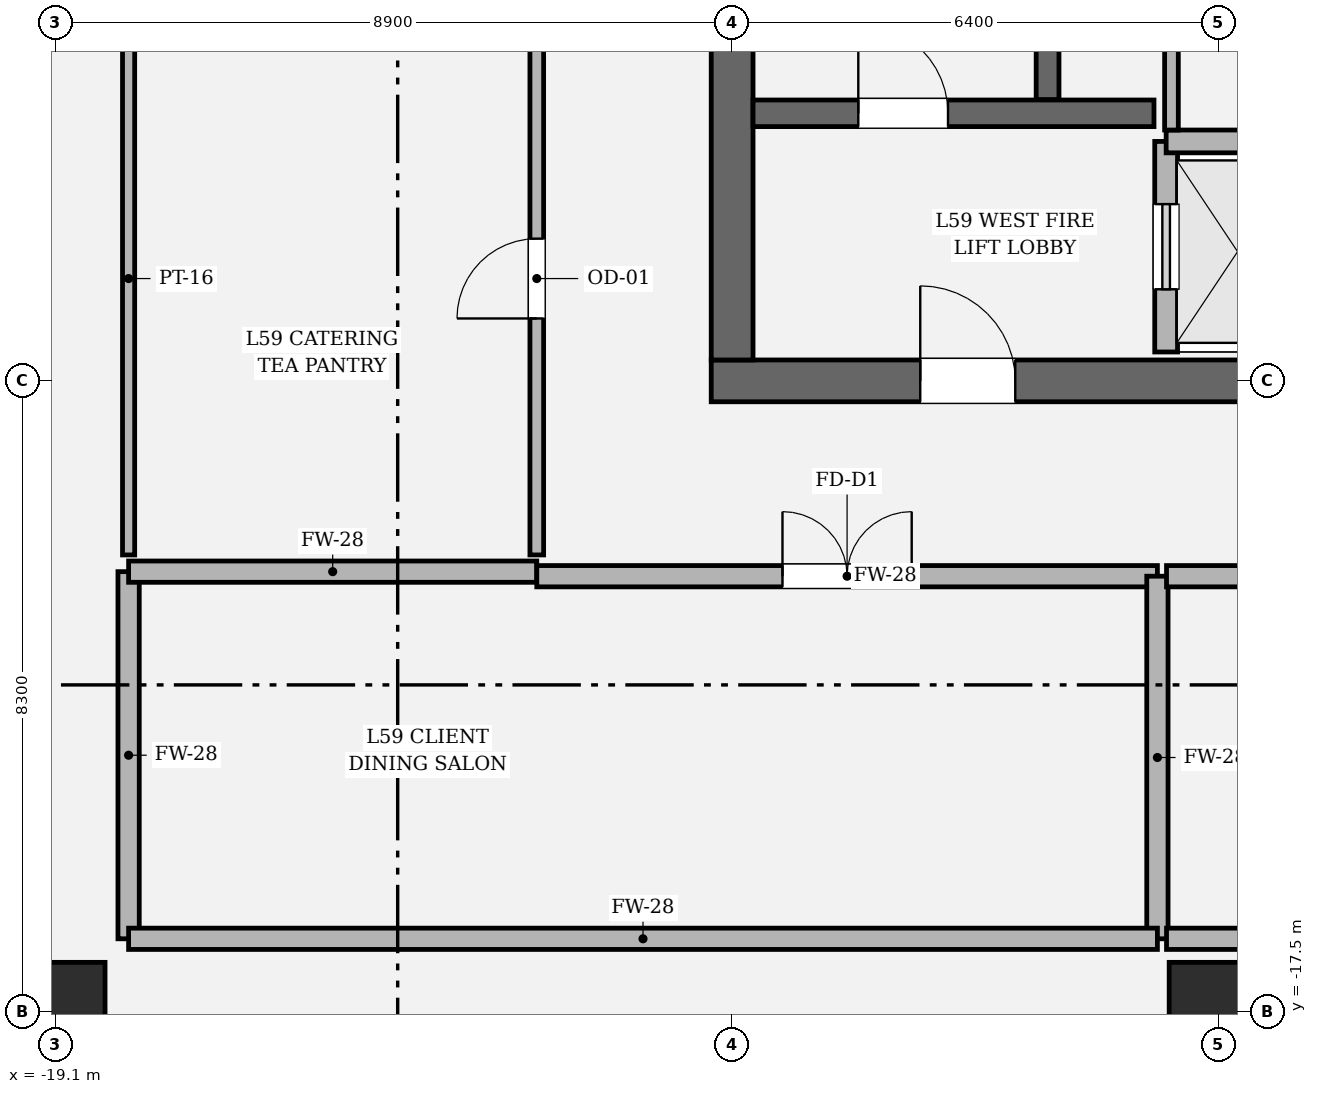
"""IFC4 building model, lengths in metres.
Left out: names, types, materials, properties, quantities, classifications, styles, units other than length and angle.
Written with IfcOpenShell. Run it as: python <this file> out.ifc"""

import sys

from ifc_helpers import new_model, si_unit, direction, frame, frame_2d, origin, origin_2d, place, context, subcontext, project, spatial, rectangle, hollow_rectangle, extrude, element, fill, save


model = new_model("IFC4")
c1 = context("Model", 3, precision=1e-05, world=origin(), true_north=direction((0.0, 1.0)))
c2 = subcontext(c1, "Body", "Model", "MODEL_VIEW")
j1 = project(units=[si_unit("LENGTHUNIT", "METRE"), si_unit("PLANEANGLEUNIT", "RADIAN")], contexts=[c1])
p1 = place(None, origin())
s1 = spatial("IfcSite", under=j1, at=p1, CompositionType="ELEMENT")
p2 = place(p1, origin())
s2 = spatial("IfcBuilding", under=s1, at=p2, CompositionType="ELEMENT")
p3 = place(p2, frame((0.0, 0.0, 251.4)))
s3 = spatial("IfcBuildingStorey", under=s2, at=p3, CompositionType="ELEMENT", Elevation=251.4)
p4 = place(p3, frame((10.475, -9.2, 0.0), z_axis=(0.0, 0.0, 1.0), x_axis=(-1.0, 0.0, 0.0)))
e1 = element("IfcWall", 1, at=p4, inside=s3, PredefinedType="SHEAR", context=c2, shape_type="SweptSolid", body=[
    extrude(rectangle(XDim=20.95, YDim=0.55, at=frame_2d((10.475, 0.0))), origin(), (0.0, 0.0, 1.0), 4.05),
])
p5 = place(p4, frame((2.75, 0.0, 0.0)))
e2 = element("IfcOpeningElement", 2, at=p5, cuts=e1, PredefinedType="OPENING", context=c2, shape_type="SweptSolid", body=[
    extrude(rectangle(XDim=1.25, YDim=2.25, at=frame_2d((0.625, 1.125))), frame((0.0, 0.285, 0.0), z_axis=(0.0, -1.0, 0.0), x_axis=(1.0, 0.0, 0.0)), (0.0, 0.0, 1.0), 0.57),
])
p6 = place(p4, frame((16.95, 0.0, 0.0)))
e3 = element("IfcOpeningElement", 3, at=p6, cuts=e1, PredefinedType="OPENING", context=c2, shape_type="SweptSolid", body=[
    extrude(rectangle(XDim=1.25, YDim=2.25, at=frame_2d((0.625, 1.125))), frame((0.0, 0.285, 0.0), z_axis=(0.0, -1.0, 0.0), x_axis=(1.0, 0.0, 0.0)), (0.0, 0.0, 1.0), 0.57),
])
p7 = place(p3, frame((-10.2, -8.925, 0.0), z_axis=(0.0, 0.0, 1.0), x_axis=(0.0, 1.0, 0.0)))
e4 = element("IfcWall", 4, at=p7, inside=s3, PredefinedType="SHEAR", context=c2, shape_type="SweptSolid", body=[
    extrude(rectangle(XDim=17.85, YDim=0.55, at=frame_2d((8.925, 0.0))), origin(), (0.0, 0.0, 1.0), 4.05),
])
p8 = place(p7, frame((12.715, 0.0, 0.0)))
e5 = element("IfcOpeningElement", 5, at=p8, cuts=e4, PredefinedType="OPENING", context=c2, shape_type="SweptSolid", body=[
    extrude(rectangle(XDim=1.18, YDim=2.2, at=frame_2d((0.59, 1.1))), frame((0.0, 0.285, 0.0), z_axis=(0.0, -1.0, 0.0), x_axis=(1.0, 0.0, 0.0)), (0.0, 0.0, 1.0), 0.57),
])
p9 = place(p3, frame((-6.05, -5.5, 0.0), z_axis=(0.0, 0.0, 1.0), x_axis=(0.0, 1.0, 0.0)))
e6 = element("IfcWall", 6, at=p9, inside=s3, PredefinedType="SOLIDWALL", context=c2, shape_type="SweptSolid", body=[
    extrude(rectangle(XDim=8.95, YDim=0.3, at=frame_2d((4.475, 0.0))), origin(), (0.0, 0.0, 1.0), 4.05),
])
p10 = place(p3, frame((-9.925, -5.68, 0.0), z_axis=(0.0, 0.0, 1.0), x_axis=(1.0, 0.0, 0.0)))
e7 = element("IfcWall", 7, at=p10, inside=s3, PredefinedType="SOLIDWALL", context=c2, shape_type="SweptSolid", body=[
    extrude(rectangle(XDim=5.275, YDim=0.35, at=frame_2d((2.638, 0.0))), origin(), (0.0, 0.0, 1.0), 4.05),
])
p11 = place(p10, frame((1.385, 0.0, 0.0)))
e8 = element("IfcOpeningElement", 8, at=p11, cuts=e7, PredefinedType="OPENING", context=c2, shape_type="SweptSolid", body=[
    extrude(rectangle(XDim=1.18, YDim=2.2, at=frame_2d((0.59, 1.1))), frame((0.0, 0.185, 0.0), z_axis=(0.0, -1.0, 0.0), x_axis=(1.0, 0.0, 0.0)), (0.0, 0.0, 1.0), 0.37),
])
for number, where, z_axis, x_axis in (
    (9, (-19.1, -17.5, 0.0), (0.0, 0.0, 1.0), (1.0, 0.0, 0.0)),
    (10, (-3.8, -17.5, 0.0), (0.0, 0.0, 1.0), (1.0, 0.0, 0.0)),
):
    element("IfcColumn", number, at=place(p3, frame(where, z_axis=z_axis, x_axis=x_axis)), inside=s3, PredefinedType="COLUMN", context=c2, shape_type="SweptSolid", body=[
        extrude(hollow_rectangle(XDim=1.3, YDim=1.3, WallThickness=0.038, at=origin_2d()), origin(), (0.0, 0.0, 1.0), 4.05),
    ])
p12 = place(p3, frame((-19.646, -16.949, 0.0), z_axis=(0.0, 0.0, 1.0), x_axis=(0.707106781187, -0.707106781187, 0.0)))
e11 = element("IfcWall", 11, at=p12, inside=s3, PredefinedType="SOLIDWALL", context=c2, shape_type="SweptSolid", body=[
    extrude(rectangle(XDim=1.552, YDim=0.32, at=frame_2d((0.776, 0.0))), origin(), (0.0, 0.0, 1.0), 3.244),
])
p13 = place(p3, frame((-4.49, -8.82, 0.0), z_axis=(0.0, 0.0, 1.0), x_axis=(0.0, 1.0, 0.0)))
e12 = element("IfcWall", 12, at=p13, inside=s3, PredefinedType="SOLIDWALL", context=c2, shape_type="SweptSolid", body=[
    extrude(rectangle(XDim=2.77, YDim=0.3, at=frame_2d((1.385, 0.0))), origin(), (0.0, 0.0, 1.0), 3.85),
])
p14 = place(p13, frame((0.825, 0.0, 0.0)))
e13 = element("IfcOpeningElement", 13, at=p14, cuts=e12, PredefinedType="OPENING", context=c2, shape_type="SweptSolid", body=[
    extrude(rectangle(XDim=1.12, YDim=2.25, at=frame_2d((0.56, 1.125))), frame((0.0, 0.16, 0.0), z_axis=(0.0, -1.0, 0.0), x_axis=(1.0, 0.0, 0.0)), (0.0, 0.0, 1.0), 0.32),
])
p15 = place(p3, frame((-4.49, -6.05, 0.0), z_axis=(0.0, 0.0, 1.0), x_axis=(1.0, 0.0, 0.0)))
e14 = element("IfcWall", 14, at=p15, inside=s3, PredefinedType="SOLIDWALL", context=c2, shape_type="SweptSolid", body=[
    extrude(rectangle(XDim=1.88, YDim=0.3, at=frame_2d((0.94, 0.0))), origin(), (0.0, 0.0, 1.0), 3.85),
])
p16 = place(p3, frame((-4.42, -4.16, 0.0), z_axis=(0.0, 0.0, 1.0), x_axis=(0.0, -1.0, 0.0)))
e15 = element("IfcWall", 15, at=p16, inside=s3, PredefinedType="PARTITIONING", context=c2, shape_type="SweptSolid", body=[
    extrude(rectangle(XDim=1.74, YDim=0.18, at=frame_2d((0.87, 0.0))), origin(), (0.0, 0.0, 1.0), 3.85),
])
p17 = place(p3, frame((-18.14, -16.54, 0.0), z_axis=(0.0, 0.0, 1.0), x_axis=(0.0, 1.0, 0.0)))
e16 = element("IfcWall", 16, at=p17, inside=s3, PredefinedType="SOLIDWALL", context=c2, shape_type="SweptSolid", body=[
    extrude(rectangle(XDim=4.83, YDim=0.28, at=frame_2d((2.415, 0.0))), origin(), (0.0, 0.0, 1.0), 3.484),
])
p18 = place(p3, frame((-18.14, -11.71, 0.0), z_axis=(0.0, 0.0, 1.0), x_axis=(1.0, 0.0, 0.0)))
e17 = element("IfcWall", 17, at=p18, inside=s3, PredefinedType="SOLIDWALL", context=c2, shape_type="SweptSolid", body=[
    extrude(rectangle(XDim=5.37, YDim=0.28, at=frame_2d((2.685, 0.0))), origin(), (0.0, 0.0, 1.0), 3.484),
])
p19 = place(p3, frame((-12.77, -11.77, 0.0), z_axis=(0.0, 0.0, 1.0), x_axis=(1.0, 0.0, 0.0)))
e18 = element("IfcWall", 18, at=p19, inside=s3, PredefinedType="SOLIDWALL", context=c2, shape_type="SweptSolid", body=[
    extrude(rectangle(XDim=8.165, YDim=0.28, at=frame_2d((4.083, 0.0))), origin(), (0.0, 0.0, 1.0), 3.244),
])
p20 = place(p19, frame((3.232, 0.0, 0.0)))
e19 = element("IfcOpeningElement", 19, at=p20, cuts=e18, PredefinedType="OPENING", context=c2, shape_type="SweptSolid", body=[
    extrude(rectangle(XDim=1.7, YDim=2.3, at=frame_2d((0.85, 1.15))), frame((0.0, 0.15, 0.0), z_axis=(0.0, -1.0, 0.0), x_axis=(1.0, 0.0, 0.0)), (0.0, 0.0, 1.0), 0.3),
])
p21 = place(p3, frame((-4.605, -11.77, 0.0), z_axis=(0.0, 0.0, 1.0), x_axis=(0.0, -1.0, 0.0)))
e20 = element("IfcWall", 20, at=p21, inside=s3, PredefinedType="SOLIDWALL", context=c2, shape_type="SweptSolid", body=[
    extrude(rectangle(XDim=4.77, YDim=0.28, at=frame_2d((2.385, 0.0))), origin(), (0.0, 0.0, 1.0), 3.85),
])
p22 = place(p3, frame((-4.605, -16.54, 0.0), z_axis=(0.0, 0.0, 1.0), x_axis=(-1.0, 0.0, 0.0)))
e21 = element("IfcWall", 21, at=p22, inside=s3, PredefinedType="SOLIDWALL", context=c2, shape_type="SweptSolid", body=[
    extrude(rectangle(XDim=13.535, YDim=0.28, at=frame_2d((6.768, 0.0))), origin(), (0.0, 0.0, 1.0), 3.244),
])
p23 = place(p3, frame((-4.485, -11.77, 0.0), z_axis=(0.0, 0.0, 1.0), x_axis=(1.0, 0.0, 0.0)))
e22 = element("IfcWall", 22, at=p23, inside=s3, PredefinedType="SOLIDWALL", context=c2, shape_type="SweptSolid", body=[
    extrude(rectangle(XDim=17.255, YDim=0.28, at=frame_2d((8.627, 0.0))), origin(), (0.0, 0.0, 1.0), 3.244),
])
p24 = place(p23, frame((7.778, 0.0, 0.0)))
e23 = element("IfcOpeningElement", 23, at=p24, cuts=e22, PredefinedType="OPENING", context=c2, shape_type="SweptSolid", body=[
    extrude(rectangle(XDim=1.7, YDim=2.3, at=frame_2d((0.85, 1.15))), frame((0.0, 0.15, 0.0), z_axis=(0.0, -1.0, 0.0), x_axis=(1.0, 0.0, 0.0)), (0.0, 0.0, 1.0), 0.3),
])
p25 = place(p3, frame((24.04, -16.54, 0.0), z_axis=(0.0, 0.0, 1.0), x_axis=(-1.0, 0.0, 0.0)))
e24 = element("IfcWall", 24, at=p25, inside=s3, PredefinedType="SOLIDWALL", context=c2, shape_type="SweptSolid", body=[
    extrude(rectangle(XDim=28.525, YDim=0.28, at=frame_2d((14.263, 0.0))), origin(), (0.0, 0.0, 1.0), 3.244),
])
p26 = place(p3, frame((-12.77, -4.218, 0.0), z_axis=(0.0, 0.0, 1.0), x_axis=(0.0, -1.0, 0.0)))
e25 = element("IfcWall", 25, at=p26, inside=s3, PredefinedType="PARTITIONING", context=c2, shape_type="SweptSolid", body=[
    extrude(rectangle(XDim=7.272, YDim=0.18, at=frame_2d((3.636, 0.0))), origin(), (0.0, 0.0, 1.0), 3.244),
])
p27 = place(p26, frame((3.111, 0.0, 0.0)))
e26 = element("IfcOpeningElement", 26, at=p27, cuts=e25, PredefinedType="OPENING", context=c2, shape_type="SweptSolid", body=[
    extrude(rectangle(XDim=1.05, YDim=2.2, at=frame_2d((0.525, 1.1))), frame((0.0, 0.1, 0.0), z_axis=(0.0, -1.0, 0.0), x_axis=(1.0, 0.0, 0.0)), (0.0, 0.0, 1.0), 0.2),
])
p28 = place(p3, frame((-18.14, -11.49, 0.0), z_axis=(0.0, 0.0, 1.0), x_axis=(0.0, 1.0, 0.0)))
e27 = element("IfcWall", 27, at=p28, inside=s3, PredefinedType="PARTITIONING", context=c2, shape_type="SweptSolid", body=[
    extrude(rectangle(XDim=7.272, YDim=0.16, at=frame_2d((3.636, 0.0))), origin(), (0.0, 0.0, 1.0), 3.244),
])
p29 = place(p11, origin())
e28 = element("IfcDoor", 28, at=p29, inside=s3, OperationType="SINGLE_SWING_LEFT", PredefinedType="DOOR", context=c2, shape_type="SweptSolid", body=[
    extrude(rectangle(XDim=1.18, YDim=2.2, at=frame_2d((0.59, 1.1))), frame((0.0, 0.025, 0.0), z_axis=(0.0, -1.0, 0.0), x_axis=(1.0, 0.0, 0.0)), (0.0, 0.0, 1.0), 0.05),
])
fill(e8, e28)
p30 = place(p6, origin())
e29 = element("IfcDoor", 29, at=p30, inside=s3, OperationType="SINGLE_SWING_RIGHT", PredefinedType="DOOR", context=c2, shape_type="SweptSolid", body=[
    extrude(rectangle(XDim=1.25, YDim=2.25, at=frame_2d((0.625, 1.125))), frame((0.0, 0.025, 0.0), z_axis=(0.0, -1.0, 0.0), x_axis=(1.0, 0.0, 0.0)), (0.0, 0.0, 1.0), 0.05),
])
fill(e3, e29)
p31 = place(p14, origin())
e30 = element("IfcDoor", 30, at=p31, inside=s3, OperationType="SLIDING_TO_LEFT", PredefinedType="DOOR", context=c2, shape_type="SweptSolid", body=[
    extrude(rectangle(XDim=1.12, YDim=2.25, at=frame_2d((0.56, 1.125))), frame((0.0, 0.025, 0.0), z_axis=(0.0, -1.0, 0.0), x_axis=(1.0, 0.0, 0.0)), (0.0, 0.0, 1.0), 0.05),
])
fill(e13, e30)
p32 = place(p20, origin())
e31 = element("IfcDoor", 31, at=p32, inside=s3, OperationType="DOUBLE_DOOR_SINGLE_SWING", PredefinedType="DOOR", context=c2, shape_type="SweptSolid", body=[
    extrude(rectangle(XDim=1.7, YDim=2.3, at=frame_2d((0.85, 1.15))), frame((0.0, 0.025, 0.0), z_axis=(0.0, -1.0, 0.0), x_axis=(1.0, 0.0, 0.0)), (0.0, 0.0, 1.0), 0.05),
])
fill(e19, e31)
p33 = place(p27, origin())
e32 = element("IfcDoor", 32, at=p33, inside=s3, OperationType="SINGLE_SWING_RIGHT", PredefinedType="DOOR", context=c2, shape_type="SweptSolid", body=[
    extrude(rectangle(XDim=1.05, YDim=2.2, at=frame_2d((0.525, 1.1))), frame((0.0, 0.025, 0.0), z_axis=(0.0, -1.0, 0.0), x_axis=(1.0, 0.0, 0.0)), (0.0, 0.0, 1.0), 0.05),
])
fill(e26, e32)
save(model, sys.argv[1])
